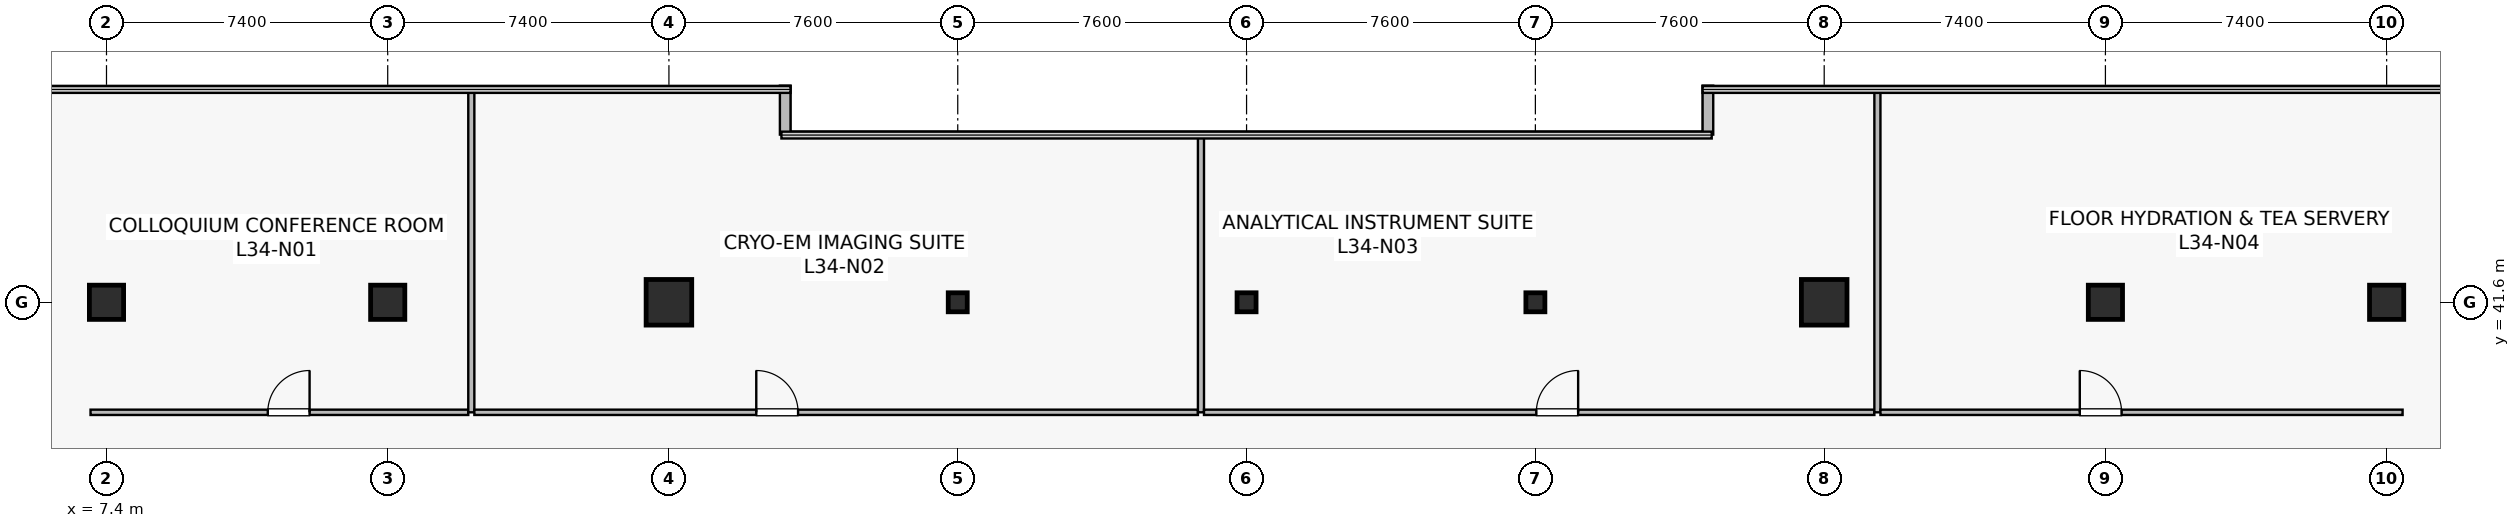
"""IFC4 building model, lengths in metres.
Left out: names, types, materials, properties, quantities, classifications, styles, units other than length and angle.
Written with IfcOpenShell. Run it as: python <this file> out.ifc"""

import sys

from ifc_helpers import new_model, si_unit, direction, frame, frame_2d, origin, origin_2d, place, context, subcontext, project, spatial, rectangle, hollow_rectangle, extrude, source, transform, mapped, element, fill, save


model = new_model("IFC4")
c1 = context("Model", 3, precision=1e-05, world=origin(), true_north=direction((0.0, 1.0)))
c2 = subcontext(c1, "Body", "Model", "MODEL_VIEW")
j1 = project(units=[si_unit("LENGTHUNIT", "METRE"), si_unit("PLANEANGLEUNIT", "RADIAN")], contexts=[c1])
p1 = place(None, origin())
s1 = spatial("IfcSite", under=j1, at=p1, CompositionType="ELEMENT")
p2 = place(p1, origin())
s2 = spatial("IfcBuilding", under=s1, at=p2, CompositionType="ELEMENT")
p3 = place(p2, frame((0.0, 0.0, 142.0)))
s3 = spatial("IfcBuildingStorey", under=s2, at=p3, CompositionType="ELEMENT", Elevation=142.0)
m1 = source(origin(), c2, "Body", "SweptSolid", [
    extrude(rectangle(XDim=0.9, YDim=0.9, at=origin_2d()), origin(), (0.0, 0.0, 1.0), 4.1),
])
p4 = place(p3, frame((14.8, 41.6, 0.0), z_axis=(0.0, 0.0, 1.0), x_axis=(1.0, 0.0, 0.0)))
e1 = element("IfcColumn", 1, at=p4, inside=s3, PredefinedType="COLUMN", context=c2, shape_type="MappedRepresentation", body=[
    mapped(m1, transform((0.0, 0.0, 0.0), scale=1.0)),
])
m2 = source(origin(), c2, "Body", "SweptSolid", [
    extrude(rectangle(XDim=1.2, YDim=1.2, at=origin_2d()), origin(), (0.0, 0.0, 1.0), 4.1),
])
for number, where, z_axis, x_axis in (
    (2, (22.2, 41.6, 0.0), (0.0, 0.0, 1.0), (1.0, 0.0, 0.0)),
    (3, (52.6, 41.6, 0.0), (0.0, 0.0, 1.0), (1.0, 0.0, 0.0)),
):
    element("IfcColumn", number, at=place(p3, frame(where, z_axis=z_axis, x_axis=x_axis)), inside=s3, PredefinedType="COLUMN", context=c2, shape_type="MappedRepresentation", body=[
        mapped(m2, transform((0.0, 0.0, 0.0), scale=1.0)),
    ])
for number, where, z_axis, x_axis in (
    (4, (60.0, 41.6, 0.0), (0.0, 0.0, 1.0), (1.0, 0.0, 0.0)),
    (5, (7.4, 41.6, 0.0), (0.0, 0.0, 1.0), (1.0, 0.0, 0.0)),
    (6, (67.4, 41.6, 0.0), (0.0, 0.0, 1.0), (1.0, 0.0, 0.0)),
):
    element("IfcColumn", number, at=place(p3, frame(where, z_axis=z_axis, x_axis=x_axis)), inside=s3, PredefinedType="COLUMN", context=c2, shape_type="MappedRepresentation", body=[
        mapped(m1, transform((0.0, 0.0, 0.0), scale=1.0)),
    ])
m3 = source(origin(), c2, "Body", "SweptSolid", [
    extrude(hollow_rectangle(XDim=0.5, YDim=0.5, WallThickness=0.022, at=origin_2d()), origin(), (0.0, 0.0, 1.0), 4.1),
])
for number, where, z_axis, x_axis in (
    (7, (29.8, 41.6, 0.0), (0.0, 0.0, 1.0), (1.0, 0.0, 0.0)),
    (8, (37.4, 41.6, 0.0), (0.0, 0.0, 1.0), (1.0, 0.0, 0.0)),
    (9, (45.0, 41.6, 0.0), (0.0, 0.0, 1.0), (1.0, 0.0, 0.0)),
):
    element("IfcColumn", number, at=place(p3, frame(where, z_axis=z_axis, x_axis=x_axis)), inside=s3, PredefinedType="COLUMN", context=c2, shape_type="MappedRepresentation", body=[
        mapped(m3, transform((0.0, 0.0, 0.0), scale=1.0)),
    ])
for number, where, z_axis, x_axis in (
    (10, (49.54, 47.3, 0.0), (0.0, 0.0, 1.0), (0.0, -1.0, 0.0)),
    (11, (25.26, 46.012, 0.0), (0.0, 0.0, 1.0), (0.0, 1.0, 0.0)),
):
    element("IfcWall", number, at=place(p3, frame(where, z_axis=z_axis, x_axis=x_axis)), inside=s3, PredefinedType="STANDARD", context=c2, shape_type="SweptSolid", body=[
        extrude(rectangle(XDim=1.288, YDim=0.28, at=frame_2d((0.644, 0.0))), origin(), (0.0, 0.0, 1.0), 3.79),
    ])
p5 = place(p3, frame((6.98, 38.705, 0.0), z_axis=(0.0, 0.0, 1.0), x_axis=(1.0, 0.0, 0.0)))
e12 = element("IfcWall", 12, at=p5, inside=s3, PredefinedType="PARTITIONING", context=c2, shape_type="SweptSolid", body=[
    extrude(rectangle(XDim=9.94, YDim=0.14, at=frame_2d((4.97, 0.0))), origin(), (0.0, 0.0, 1.0), 3.125),
])
p6 = place(p5, frame((4.664, 0.0, 0.0)))
e13 = element("IfcOpeningElement", 13, at=p6, cuts=e12, PredefinedType="OPENING", context=c2, shape_type="SweptSolid", body=[
    extrude(rectangle(XDim=1.1, YDim=2.18, at=frame_2d((0.55, 1.09))), frame((0.0, 0.08, 0.0), z_axis=(0.0, -1.0, 0.0), x_axis=(1.0, 0.0, 0.0)), (0.0, 0.0, 1.0), 0.16),
])
p7 = place(p3, frame((17.0, 38.705, 0.0), z_axis=(0.0, 0.0, 1.0), x_axis=(0.0, 1.0, 0.0)))
e14 = element("IfcWall", 14, at=p7, inside=s3, PredefinedType="PARTITIONING", context=c2, shape_type="SweptSolid", body=[
    extrude(rectangle(XDim=8.485, YDim=0.16, at=frame_2d((4.242, 0.0))), origin(), (0.0, 0.0, 1.0), 3.075),
])
p8 = place(p3, frame((17.08, 38.705, 0.0), z_axis=(0.0, 0.0, 1.0), x_axis=(1.0, 0.0, 0.0)))
e15 = element("IfcWall", 15, at=p8, inside=s3, PredefinedType="PARTITIONING", context=c2, shape_type="SweptSolid", body=[
    extrude(rectangle(XDim=19.04, YDim=0.14, at=frame_2d((9.52, 0.0))), origin(), (0.0, 0.0, 1.0), 3.125),
])
p9 = place(p8, frame((7.418, 0.0, 0.0)))
e16 = element("IfcOpeningElement", 16, at=p9, cuts=e15, PredefinedType="OPENING", context=c2, shape_type="SweptSolid", body=[
    extrude(rectangle(XDim=1.1, YDim=2.18, at=frame_2d((0.55, 1.09))), frame((0.0, 0.08, 0.0), z_axis=(0.0, -1.0, 0.0), x_axis=(1.0, 0.0, 0.0)), (0.0, 0.0, 1.0), 0.16),
])
p10 = place(p3, frame((36.2, 38.705, 0.0), z_axis=(0.0, 0.0, 1.0), x_axis=(0.0, 1.0, 0.0)))
e17 = element("IfcWall", 17, at=p10, inside=s3, PredefinedType="PARTITIONING", context=c2, shape_type="SweptSolid", body=[
    extrude(rectangle(XDim=7.285, YDim=0.16, at=frame_2d((3.643, 0.0))), origin(), (0.0, 0.0, 1.0), 3.075),
])
p11 = place(p3, frame((36.28, 38.705, 0.0), z_axis=(0.0, 0.0, 1.0), x_axis=(1.0, 0.0, 0.0)))
e18 = element("IfcWall", 18, at=p11, inside=s3, PredefinedType="PARTITIONING", context=c2, shape_type="SweptSolid", body=[
    extrude(rectangle(XDim=17.64, YDim=0.14, at=frame_2d((8.82, 0.0))), origin(), (0.0, 0.0, 1.0), 3.125),
])
p12 = place(p11, frame((8.745, 0.0, 0.0)))
e19 = element("IfcOpeningElement", 19, at=p12, cuts=e18, PredefinedType="OPENING", context=c2, shape_type="SweptSolid", body=[
    extrude(rectangle(XDim=1.1, YDim=2.18, at=frame_2d((0.55, 1.09))), frame((0.0, 0.08, 0.0), z_axis=(0.0, -1.0, 0.0), x_axis=(1.0, 0.0, 0.0)), (0.0, 0.0, 1.0), 0.16),
])
p13 = place(p3, frame((54.0, 38.705, 0.0), z_axis=(0.0, 0.0, 1.0), x_axis=(0.0, 1.0, 0.0)))
e20 = element("IfcWall", 20, at=p13, inside=s3, PredefinedType="PARTITIONING", context=c2, shape_type="SweptSolid", body=[
    extrude(rectangle(XDim=8.485, YDim=0.16, at=frame_2d((4.242, 0.0))), origin(), (0.0, 0.0, 1.0), 3.075),
])
p14 = place(p3, frame((54.08, 38.705, 0.0), z_axis=(0.0, 0.0, 1.0), x_axis=(1.0, 0.0, 0.0)))
e21 = element("IfcWall", 21, at=p14, inside=s3, PredefinedType="PARTITIONING", context=c2, shape_type="SweptSolid", body=[
    extrude(rectangle(XDim=13.74, YDim=0.14, at=frame_2d((6.87, 0.0))), origin(), (0.0, 0.0, 1.0), 3.125),
])
p15 = place(p14, frame((5.245, 0.0, 0.0)))
e22 = element("IfcOpeningElement", 22, at=p15, cuts=e21, PredefinedType="OPENING", context=c2, shape_type="SweptSolid", body=[
    extrude(rectangle(XDim=1.1, YDim=2.18, at=frame_2d((0.55, 1.09))), frame((0.0, 0.08, 0.0), z_axis=(0.0, -1.0, 0.0), x_axis=(1.0, 0.0, 0.0)), (0.0, 0.0, 1.0), 0.16),
])
m4 = source(origin(), c2, "Body", "SweptSolid", [
    extrude(rectangle(XDim=1.1, YDim=2.18, at=frame_2d((0.55, 1.09))), frame((0.0, 0.025, 0.0), z_axis=(0.0, -1.0, 0.0), x_axis=(1.0, 0.0, 0.0)), (0.0, 0.0, 1.0), 0.05),
])
p16 = place(p6, origin())
e23 = element("IfcDoor", 23, at=p16, inside=s3, OperationType="SINGLE_SWING_RIGHT", PredefinedType="DOOR", context=c2, shape_type="MappedRepresentation", body=[
    mapped(m4, transform((0.0, 0.0, 0.0), scale=1.0)),
])
fill(e13, e23)
p17 = place(p9, origin())
e24 = element("IfcDoor", 24, at=p17, inside=s3, OperationType="SINGLE_SWING_LEFT", PredefinedType="DOOR", context=c2, shape_type="MappedRepresentation", body=[
    mapped(m4, transform((0.0, 0.0, 0.0), scale=1.0)),
])
fill(e16, e24)
p18 = place(p12, origin())
e25 = element("IfcDoor", 25, at=p18, inside=s3, OperationType="SINGLE_SWING_RIGHT", PredefinedType="DOOR", context=c2, shape_type="MappedRepresentation", body=[
    mapped(m4, transform((0.0, 0.0, 0.0), scale=1.0)),
])
fill(e19, e25)
p19 = place(p15, origin())
e26 = element("IfcDoor", 26, at=p19, inside=s3, OperationType="SINGLE_SWING_LEFT", PredefinedType="DOOR", context=c2, shape_type="MappedRepresentation", body=[
    mapped(m4, transform((0.0, 0.0, 0.0), scale=1.0)),
])
fill(e22, e26)
save(model, sys.argv[1])
